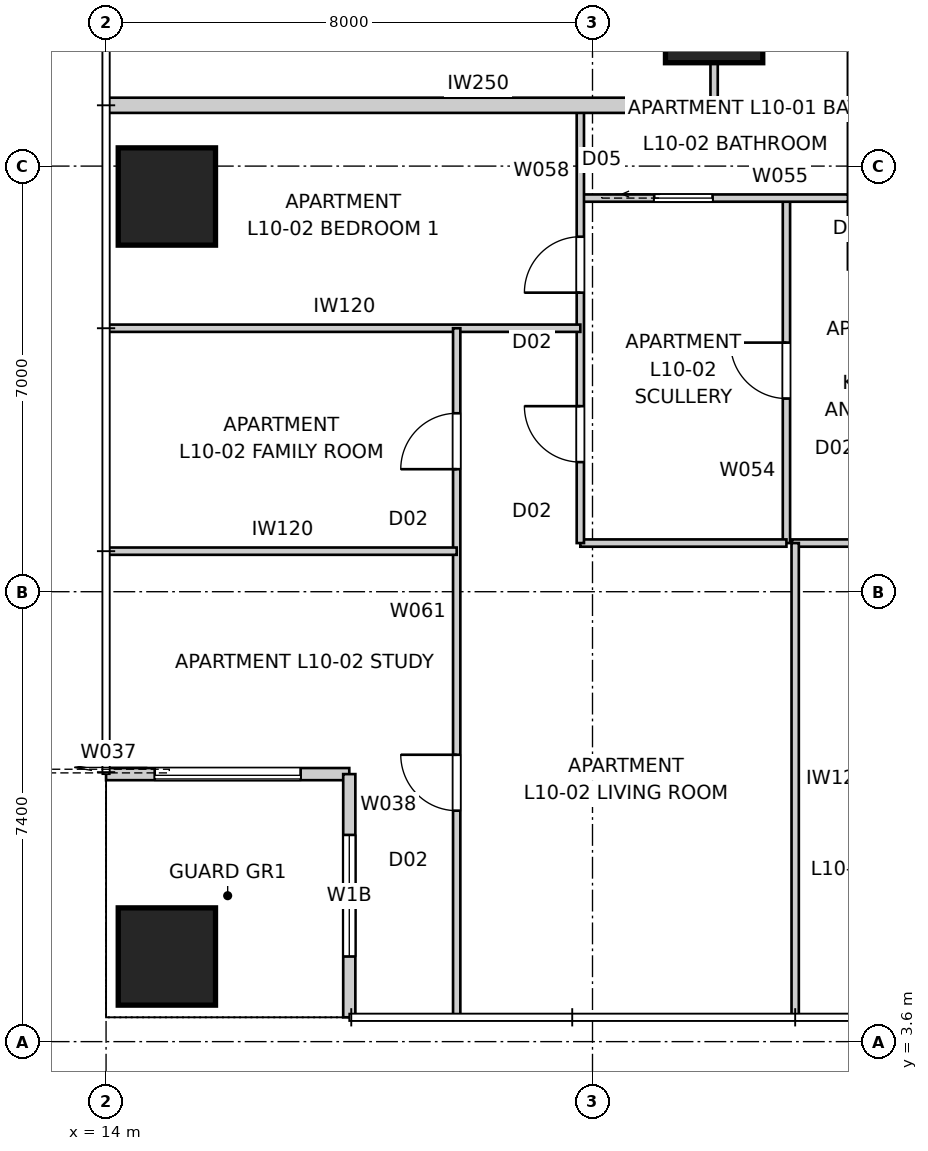
"""IFC4 building model, lengths in metres.
Left out: names, types, materials, properties, quantities, classifications, styles, units other than length and angle.
Written with IfcOpenShell. Run it as: python <this file> out.ifc"""

import sys

from ifc_helpers import new_model, si_unit, direction, frame, frame_2d, origin, origin_2d, place, context, subcontext, project, spatial, rectangle, extrude, element, fill, save


model = new_model("IFC4")
c1 = context("Model", 3, precision=1e-05, world=origin(), true_north=direction((0.0, 1.0)))
c2 = subcontext(c1, "Body", "Model", "MODEL_VIEW")
j1 = project(units=[si_unit("LENGTHUNIT", "METRE"), si_unit("PLANEANGLEUNIT", "RADIAN")], contexts=[c1])
p1 = place(None, origin())
s1 = spatial("IfcSite", under=j1, at=p1, CompositionType="ELEMENT")
p2 = place(p1, origin())
s2 = spatial("IfcBuilding", under=s1, at=p2, CompositionType="ELEMENT")
p3 = place(p2, frame((0.0, 0.0, 38.8)))
s3 = spatial("IfcBuildingStorey", under=s2, at=p3, CompositionType="ELEMENT", Elevation=38.8)
for number, where, z_axis, x_axis in (
    (1, (15.0, 5.0, 0.0), (0.0, 0.0, 1.0), (1.0, 0.0, 0.0)),
    (2, (15.0, 17.5, 0.0), (0.0, 0.0, 1.0), (1.0, 0.0, 0.0)),
):
    element("IfcColumn", number, at=place(p3, frame(where, z_axis=z_axis, x_axis=x_axis)), inside=s3, PredefinedType="COLUMN", context=c2, shape_type="SweptSolid", body=[
        extrude(rectangle(XDim=1.6, YDim=1.6, at=origin_2d()), origin(), (0.0, 0.0, 1.0), 3.2),
    ])
p4 = place(p3, frame((24.0, 20.5, 0.0), z_axis=(0.0, 0.0, 1.0), x_axis=(1.0, 0.0, 0.0)))
e3 = element("IfcColumn", 3, at=p4, inside=s3, PredefinedType="COLUMN", context=c2, shape_type="SweptSolid", body=[
    extrude(rectangle(XDim=1.6, YDim=1.6, at=origin_2d()), origin(), (0.0, 0.0, 1.0), 3.4),
])
p5 = place(p3, frame((14.0, 8.0, 0.0), z_axis=(0.0, 0.0, 1.0), x_axis=(1.0, 0.0, 0.0)))
e4 = element("IfcWall", 4, at=p5, inside=s3, PredefinedType="SOLIDWALL", context=c2, shape_type="SweptSolid", body=[
    extrude(rectangle(XDim=4.0, YDim=0.2, at=frame_2d((2.0, 0.0))), origin(), (0.0, 0.0, 1.0), 3.2),
])
p6 = place(p5, frame((0.8, 0.0, 0.0)))
e5 = element("IfcOpeningElement", 5, at=p6, cuts=e4, PredefinedType="OPENING", context=c2, shape_type="SweptSolid", body=[
    extrude(rectangle(XDim=2.4, YDim=2.1, at=frame_2d((1.2, 1.05))), frame((0.0, 0.11, 0.0), z_axis=(0.0, -1.0, 0.0), x_axis=(1.0, 0.0, 0.0)), (0.0, 0.0, 1.0), 0.22),
])
p7 = place(p3, frame((18.0, 8.0, 0.0), z_axis=(0.0, 0.0, 1.0), x_axis=(0.0, -1.0, 0.0)))
e6 = element("IfcWall", 6, at=p7, inside=s3, PredefinedType="SOLIDWALL", context=c2, shape_type="SweptSolid", body=[
    extrude(rectangle(XDim=4.0, YDim=0.2, at=frame_2d((2.0, 0.0))), origin(), (0.0, 0.0, 1.0), 3.2),
])
p8 = place(p7, frame((1.0, 0.0, 0.4)))
e7 = element("IfcOpeningElement", 7, at=p8, cuts=e6, PredefinedType="OPENING", context=c2, shape_type="SweptSolid", body=[
    extrude(rectangle(XDim=2.0, YDim=1.8, at=frame_2d((1.0, 0.9))), frame((0.0, 0.11, 0.0), z_axis=(0.0, -1.0, 0.0), x_axis=(1.0, 0.0, 0.0)), (0.0, 0.0, 1.0), 0.22),
])
p9 = place(p3, frame((26.3, 44.5, 0.0), z_axis=(0.0, 0.0, 1.0), x_axis=(0.0, -1.0, 0.0)))
e8 = element("IfcWall", 8, at=p9, inside=s3, PredefinedType="PARTITIONING", context=c2, shape_type="SweptSolid", body=[
    extrude(rectangle(XDim=28.2, YDim=0.2, at=frame_2d((14.1, 0.0))), origin(), (0.0, 0.0, 1.0), 3.2),
])
p10 = place(p9, frame((11.826, 0.0, 0.0)))
e9 = element("IfcOpeningElement", 9, at=p10, cuts=e8, PredefinedType="OPENING", context=c2, shape_type="SweptSolid", body=[
    extrude(rectangle(XDim=1.02, YDim=2.34, at=frame_2d((0.51, 1.17))), frame((0.0, 0.11, 0.0), z_axis=(0.0, -1.0, 0.0), x_axis=(1.0, 0.0, 0.0)), (0.0, 0.0, 1.0), 0.22),
])
p11 = place(p9, frame((16.048, 0.0, 0.0)))
e10 = element("IfcOpeningElement", 10, at=p11, cuts=e8, PredefinedType="OPENING", context=c2, shape_type="SweptSolid", body=[
    extrude(rectangle(XDim=1.02, YDim=2.34, at=frame_2d((0.51, 1.17))), frame((0.0, 0.11, 0.0), z_axis=(0.0, -1.0, 0.0), x_axis=(1.0, 0.0, 0.0)), (0.0, 0.0, 1.0), 0.22),
])
p12 = place(p9, frame((1.415, 0.0, 0.0)))
e11 = element("IfcOpeningElement", 11, at=p12, cuts=e8, PredefinedType="OPENING", context=c2, shape_type="SweptSolid", body=[
    extrude(rectangle(XDim=1.02, YDim=2.0, at=frame_2d((0.51, 1.0))), frame((0.0, 0.11, 0.0), z_axis=(0.0, -1.0, 0.0), x_axis=(1.0, 0.0, 0.0)), (0.0, 0.0, 1.0), 0.22),
])
p13 = place(p3, frame((14.0, 19.0, 0.0), z_axis=(0.0, 0.0, 1.0), x_axis=(1.0, 0.0, 0.0)))
e12 = element("IfcWall", 12, at=p13, inside=s3, PredefinedType="PARTITIONING", context=c2, shape_type="SweptSolid", body=[
    extrude(rectangle(XDim=12.24, YDim=0.25, at=frame_2d((6.12, 0.0))), origin(), (0.0, 0.0, 1.0), 3.2),
])
p14 = place(p3, frame((24.0, 19.0, 0.0), z_axis=(0.0, 0.0, 1.0), x_axis=(0.0, 1.0, 0.0)))
e13 = element("IfcWall", 13, at=p14, inside=s3, PredefinedType="PARTITIONING", context=c2, shape_type="SweptSolid", body=[
    extrude(rectangle(XDim=3.515, YDim=0.12, at=frame_2d((1.758, 0.0))), origin(), (0.0, 0.0, 1.0), 2.2),
])
p15 = place(p3, frame((25.189, 11.8, 0.0), z_axis=(0.0, 0.0, 1.0), x_axis=(0.0, 1.0, 0.0)))
e14 = element("IfcWall", 14, at=p15, inside=s3, PredefinedType="PARTITIONING", context=c2, shape_type="SweptSolid", body=[
    extrude(rectangle(XDim=5.674, YDim=0.12, at=frame_2d((2.837, 0.0))), origin(), (0.0, 0.0, 1.0), 3.2),
])
p16 = place(p15, frame((2.377, 0.0, 0.0)))
e15 = element("IfcOpeningElement", 15, at=p16, cuts=e14, PredefinedType="OPENING", context=c2, shape_type="SweptSolid", body=[
    extrude(rectangle(XDim=0.92, YDim=2.0, at=frame_2d((0.46, 1.0))), frame((0.0, 0.07, 0.0), z_axis=(0.0, -1.0, 0.0), x_axis=(1.0, 0.0, 0.0)), (0.0, 0.0, 1.0), 0.14),
])
p17 = place(p3, frame((21.8, 17.474, 0.0), z_axis=(0.0, 0.0, 1.0), x_axis=(1.0, 0.0, 0.0)))
e16 = element("IfcWall", 16, at=p17, inside=s3, PredefinedType="PARTITIONING", context=c2, shape_type="SweptSolid", body=[
    extrude(rectangle(XDim=4.4, YDim=0.12, at=frame_2d((2.2, 0.0))), origin(), (0.0, 0.0, 1.0), 3.2),
])
p18 = place(p17, frame((1.215, 0.0, 0.0)))
e17 = element("IfcOpeningElement", 17, at=p18, cuts=e16, PredefinedType="OPENING", context=c2, shape_type="SweptSolid", body=[
    extrude(rectangle(XDim=0.96, YDim=2.1, at=frame_2d((0.48, 1.05))), frame((0.0, 0.07, 0.0), z_axis=(0.0, -1.0, 0.0), x_axis=(1.0, 0.0, 0.0)), (0.0, 0.0, 1.0), 0.14),
])
p19 = place(p3, frame((47.287, 11.8, 0.0), z_axis=(0.0, 0.0, 1.0), x_axis=(-1.0, 0.0, 0.0)))
e18 = element("IfcWall", 18, at=p19, inside=s3, PredefinedType="PARTITIONING", context=c2, shape_type="SweptSolid", body=[
    extrude(rectangle(XDim=22.003, YDim=0.12, at=frame_2d((11.002, 0.0))), origin(), (0.0, 0.0, 1.0), 3.2),
])
p20 = place(p19, frame((15.968, 0.0, 0.0)))
e19 = element("IfcOpeningElement", 19, at=p20, cuts=e18, PredefinedType="OPENING", context=c2, shape_type="SweptSolid", body=[
    extrude(rectangle(XDim=0.92, YDim=2.34, at=frame_2d((0.46, 1.17))), frame((0.0, 0.07, 0.0), z_axis=(0.0, -1.0, 0.0), x_axis=(1.0, 0.0, 0.0)), (0.0, 0.0, 1.0), 0.14),
])
p21 = place(p19, frame((13.47, 0.0, 0.0)))
e20 = element("IfcOpeningElement", 20, at=p21, cuts=e18, PredefinedType="OPENING", context=c2, shape_type="SweptSolid", body=[
    extrude(rectangle(XDim=0.92, YDim=2.34, at=frame_2d((0.46, 1.17))), frame((0.0, 0.07, 0.0), z_axis=(0.0, -1.0, 0.0), x_axis=(1.0, 0.0, 0.0)), (0.0, 0.0, 1.0), 0.14),
])
p22 = place(p19, frame((5.018, 0.0, 0.0)))
e21 = element("IfcOpeningElement", 21, at=p22, cuts=e18, PredefinedType="OPENING", context=c2, shape_type="SweptSolid", body=[
    extrude(rectangle(XDim=0.92, YDim=2.34, at=frame_2d((0.46, 1.17))), frame((0.0, 0.07, 0.0), z_axis=(0.0, -1.0, 0.0), x_axis=(1.0, 0.0, 0.0)), (0.0, 0.0, 1.0), 0.14),
])
p23 = place(p19, frame((19.685, 0.0, 0.0)))
e22 = element("IfcOpeningElement", 22, at=p23, cuts=e18, PredefinedType="OPENING", context=c2, shape_type="SweptSolid", body=[
    extrude(rectangle(XDim=0.92, YDim=2.34, at=frame_2d((0.46, 1.17))), frame((0.0, 0.07, 0.0), z_axis=(0.0, -1.0, 0.0), x_axis=(1.0, 0.0, 0.0)), (0.0, 0.0, 1.0), 0.14),
])
p24 = place(p19, frame((9.138, 0.0, 0.0)))
e23 = element("IfcOpeningElement", 23, at=p24, cuts=e18, PredefinedType="OPENING", context=c2, shape_type="SweptSolid", body=[
    extrude(rectangle(XDim=0.96, YDim=2.1, at=frame_2d((0.48, 1.05))), frame((0.0, 0.07, 0.0), z_axis=(0.0, -1.0, 0.0), x_axis=(1.0, 0.0, 0.0)), (0.0, 0.0, 1.0), 0.14),
])
p25 = place(p3, frame((25.189, 11.8, 0.0), z_axis=(0.0, 0.0, 1.0), x_axis=(-1.0, 0.0, 0.0)))
e24 = element("IfcWall", 24, at=p25, inside=s3, PredefinedType="PARTITIONING", context=c2, shape_type="SweptSolid", body=[
    extrude(rectangle(XDim=3.389, YDim=0.12, at=frame_2d((1.695, 0.0))), origin(), (0.0, 0.0, 1.0), 3.2),
])
p26 = place(p3, frame((21.8, 11.8, 0.0), z_axis=(0.0, 0.0, 1.0), x_axis=(0.0, 1.0, 0.0)))
e25 = element("IfcWall", 25, at=p26, inside=s3, PredefinedType="PARTITIONING", context=c2, shape_type="SweptSolid", body=[
    extrude(rectangle(XDim=7.2, YDim=0.12, at=frame_2d((3.6, 0.0))), origin(), (0.0, 0.0, 1.0), 3.2),
])
p27 = place(p26, frame((1.332, 0.0, 0.0)))
e26 = element("IfcOpeningElement", 26, at=p27, cuts=e25, PredefinedType="OPENING", context=c2, shape_type="SweptSolid", body=[
    extrude(rectangle(XDim=0.92, YDim=2.34, at=frame_2d((0.46, 1.17))), frame((0.0, 0.07, 0.0), z_axis=(0.0, -1.0, 0.0), x_axis=(1.0, 0.0, 0.0)), (0.0, 0.0, 1.0), 0.14),
])
p28 = place(p26, frame((4.119, 0.0, 0.0)))
e27 = element("IfcOpeningElement", 27, at=p28, cuts=e25, PredefinedType="OPENING", context=c2, shape_type="SweptSolid", body=[
    extrude(rectangle(XDim=0.92, YDim=2.34, at=frame_2d((0.46, 1.17))), frame((0.0, 0.07, 0.0), z_axis=(0.0, -1.0, 0.0), x_axis=(1.0, 0.0, 0.0)), (0.0, 0.0, 1.0), 0.14),
])
for number, where, z_axis, x_axis in (
    (28, (14.04, 15.333, 0.0), (0.0, 0.0, 1.0), (1.0, 0.0, 0.0)),
    (29, (25.333, 11.8, 0.0), (0.0, 0.0, 1.0), (0.0, -1.0, 0.0)),
):
    element("IfcWall", number, at=place(p3, frame(where, z_axis=z_axis, x_axis=x_axis)), inside=s3, PredefinedType="PARTITIONING", context=c2, shape_type="SweptSolid", body=[
        extrude(rectangle(XDim=7.76, YDim=0.12, at=frame_2d((3.88, 0.0))), origin(), (0.0, 0.0, 1.0), 2.4),
    ])
p29 = place(p3, frame((19.767, 4.04, 0.0), z_axis=(0.0, 0.0, 1.0), x_axis=(0.0, 1.0, 0.0)))
e30 = element("IfcWall", 30, at=p29, inside=s3, PredefinedType="PARTITIONING", context=c2, shape_type="SweptSolid", body=[
    extrude(rectangle(XDim=11.293, YDim=0.12, at=frame_2d((5.646, 0.0))), origin(), (0.0, 0.0, 1.0), 3.2),
])
p30 = place(p29, frame((3.358, 0.0, 0.0)))
e31 = element("IfcOpeningElement", 31, at=p30, cuts=e30, PredefinedType="OPENING", context=c2, shape_type="SweptSolid", body=[
    extrude(rectangle(XDim=0.92, YDim=2.34, at=frame_2d((0.46, 1.17))), frame((0.0, 0.07, 0.0), z_axis=(0.0, -1.0, 0.0), x_axis=(1.0, 0.0, 0.0)), (0.0, 0.0, 1.0), 0.14),
])
p31 = place(p29, frame((8.975, 0.0, 0.0)))
e32 = element("IfcOpeningElement", 32, at=p31, cuts=e30, PredefinedType="OPENING", context=c2, shape_type="SweptSolid", body=[
    extrude(rectangle(XDim=0.92, YDim=2.34, at=frame_2d((0.46, 1.17))), frame((0.0, 0.07, 0.0), z_axis=(0.0, -1.0, 0.0), x_axis=(1.0, 0.0, 0.0)), (0.0, 0.0, 1.0), 0.14),
])
p32 = place(p3, frame((14.04, 11.667, 0.0), z_axis=(0.0, 0.0, 1.0), x_axis=(1.0, 0.0, 0.0)))
e33 = element("IfcWall", 33, at=p32, inside=s3, PredefinedType="PARTITIONING", context=c2, shape_type="SweptSolid", body=[
    extrude(rectangle(XDim=5.727, YDim=0.12, at=frame_2d((2.863, 0.0))), origin(), (0.0, 0.0, 1.0), 3.2),
])
p33 = place(p6, origin())
e34 = element("IfcDoor", 34, at=p33, inside=s3, OperationType="SLIDING_TO_LEFT", PredefinedType="DOOR", context=c2, shape_type="SweptSolid", body=[
    extrude(rectangle(XDim=2.4, YDim=2.1, at=frame_2d((1.2, 1.05))), frame((0.0, 0.025, 0.0), z_axis=(0.0, -1.0, 0.0), x_axis=(1.0, 0.0, 0.0)), (0.0, 0.0, 1.0), 0.05),
])
fill(e5, e34)
p34 = place(p8, origin())
e35 = element("IfcWindow", 35, at=p34, inside=s3, PartitioningType="SINGLE_PANEL", PredefinedType="WINDOW", context=c2, shape_type="SweptSolid", body=[
    extrude(rectangle(XDim=2.0, YDim=1.8, at=frame_2d((1.0, 0.9))), frame((0.0, 0.03, 0.0), z_axis=(0.0, -1.0, 0.0), x_axis=(1.0, 0.0, 0.0)), (0.0, 0.0, 1.0), 0.06),
])
fill(e7, e35)
p35 = place(p16, origin())
e36 = element("IfcDoor", 36, at=p35, inside=s3, OperationType="SINGLE_SWING_RIGHT", PredefinedType="DOOR", context=c2, shape_type="SweptSolid", body=[
    extrude(rectangle(XDim=0.92, YDim=2.0, at=frame_2d((0.46, 1.0))), frame((0.0, 0.025, 0.0), z_axis=(0.0, -1.0, 0.0), x_axis=(1.0, 0.0, 0.0)), (0.0, 0.0, 1.0), 0.05),
])
fill(e15, e36)
p36 = place(p27, origin())
e37 = element("IfcDoor", 37, at=p36, inside=s3, OperationType="SINGLE_SWING_RIGHT", PredefinedType="DOOR", context=c2, shape_type="SweptSolid", body=[
    extrude(rectangle(XDim=0.92, YDim=2.34, at=frame_2d((0.46, 1.17))), frame((0.0, 0.025, 0.0), z_axis=(0.0, -1.0, 0.0), x_axis=(1.0, 0.0, 0.0)), (0.0, 0.0, 1.0), 0.05),
])
fill(e26, e37)
p37 = place(p18, origin())
e38 = element("IfcDoor", 38, at=p37, inside=s3, OperationType="SLIDING_TO_LEFT", PredefinedType="DOOR", context=c2, shape_type="SweptSolid", body=[
    extrude(rectangle(XDim=0.96, YDim=2.1, at=frame_2d((0.48, 1.05))), frame((0.0, 0.025, 0.0), z_axis=(0.0, -1.0, 0.0), x_axis=(1.0, 0.0, 0.0)), (0.0, 0.0, 1.0), 0.05),
])
fill(e17, e38)
p38 = place(p28, origin())
e39 = element("IfcDoor", 39, at=p38, inside=s3, OperationType="SINGLE_SWING_LEFT", PredefinedType="DOOR", context=c2, shape_type="SweptSolid", body=[
    extrude(rectangle(XDim=0.92, YDim=2.34, at=frame_2d((0.46, 1.17))), frame((0.0, 0.025, 0.0), z_axis=(0.0, -1.0, 0.0), x_axis=(1.0, 0.0, 0.0)), (0.0, 0.0, 1.0), 0.05),
])
fill(e27, e39)
p39 = place(p30, origin())
e40 = element("IfcDoor", 40, at=p39, inside=s3, OperationType="SINGLE_SWING_RIGHT", PredefinedType="DOOR", context=c2, shape_type="SweptSolid", body=[
    extrude(rectangle(XDim=0.92, YDim=2.34, at=frame_2d((0.46, 1.17))), frame((0.0, 0.025, 0.0), z_axis=(0.0, -1.0, 0.0), x_axis=(1.0, 0.0, 0.0)), (0.0, 0.0, 1.0), 0.05),
])
fill(e31, e40)
p40 = place(p31, origin())
e41 = element("IfcDoor", 41, at=p40, inside=s3, OperationType="SINGLE_SWING_LEFT", PredefinedType="DOOR", context=c2, shape_type="SweptSolid", body=[
    extrude(rectangle(XDim=0.92, YDim=2.34, at=frame_2d((0.46, 1.17))), frame((0.0, 0.025, 0.0), z_axis=(0.0, -1.0, 0.0), x_axis=(1.0, 0.0, 0.0)), (0.0, 0.0, 1.0), 0.05),
])
fill(e32, e41)
save(model, sys.argv[1])
